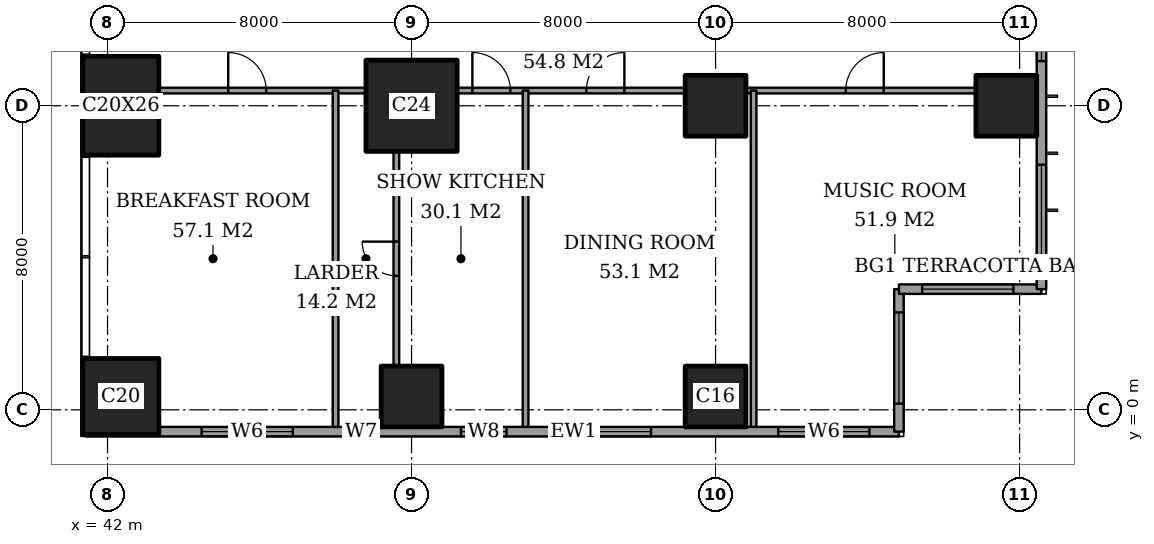
"""IFC4 building model, lengths in metres.
Left out: names, types, materials, properties, quantities, classifications, styles, units other than length and angle.
Written with IfcOpenShell. Run it as: python <this file> out.ifc"""

import sys

from ifc_helpers import new_model, si_unit, direction, frame, frame_2d, origin, origin_2d, place, context, subcontext, project, spatial, rectangle, extrude, element, fill, save


model = new_model("IFC4")
c1 = context("Model", 3, precision=1e-05, world=origin(), true_north=direction((0.0, 1.0)))
c2 = subcontext(c1, "Body", "Model", "MODEL_VIEW")
j1 = project(units=[si_unit("LENGTHUNIT", "METRE"), si_unit("PLANEANGLEUNIT", "RADIAN")], contexts=[c1])
p1 = place(None, origin())
s1 = spatial("IfcSite", under=j1, at=p1, CompositionType="ELEMENT")
p2 = place(p1, origin())
s2 = spatial("IfcBuilding", under=s1, at=p2, CompositionType="ELEMENT")
p3 = place(p2, frame((0.0, 0.0, 241.2)))
s3 = spatial("IfcBuildingStorey", under=s2, at=p3, CompositionType="ELEMENT", Elevation=241.2)
p4 = place(p3, frame((42.35, 0.35, 0.0), z_axis=(0.0, 0.0, 1.0), x_axis=(1.0, 0.0, 0.0)))
e1 = element("IfcColumn", 1, at=p4, inside=s3, PredefinedType="COLUMN", context=c2, shape_type="SweptSolid", body=[
    extrude(rectangle(XDim=2.0, YDim=2.0, at=origin_2d()), origin(), (0.0, 0.0, 1.0), 3.6),
])
p5 = place(p3, frame((42.35, 8.0, 0.0), z_axis=(0.0, 0.0, 1.0), x_axis=(1.0, 0.0, 0.0)))
e2 = element("IfcColumn", 2, at=p5, inside=s3, PredefinedType="COLUMN", context=c2, shape_type="SweptSolid", body=[
    extrude(rectangle(XDim=2.0, YDim=2.6, at=origin_2d()), origin(), (0.0, 0.0, 1.0), 3.6),
])
p6 = place(p3, frame((50.0, 0.35, 0.0), z_axis=(0.0, 0.0, 1.0), x_axis=(1.0, 0.0, 0.0)))
e3 = element("IfcColumn", 3, at=p6, inside=s3, PredefinedType="COLUMN", context=c2, shape_type="SweptSolid", body=[
    extrude(rectangle(XDim=1.6, YDim=1.6, at=origin_2d()), origin(), (0.0, 0.0, 1.0), 3.6),
])
p7 = place(p3, frame((50.0, 8.0, 0.0), z_axis=(0.0, 0.0, 1.0), x_axis=(1.0, 0.0, 0.0)))
e4 = element("IfcColumn", 4, at=p7, inside=s3, PredefinedType="COLUMN", context=c2, shape_type="SweptSolid", body=[
    extrude(rectangle(XDim=2.4, YDim=2.4, at=origin_2d()), origin(), (0.0, 0.0, 1.0), 3.6),
])
for number, where, z_axis, x_axis in (
    (5, (58.0, 0.35, 0.0), (0.0, 0.0, 1.0), (1.0, 0.0, 0.0)),
    (6, (58.0, 8.0, 0.0), (0.0, 0.0, 1.0), (1.0, 0.0, 0.0)),
    (7, (65.65, 8.0, 0.0), (0.0, 0.0, 1.0), (1.0, 0.0, 0.0)),
):
    element("IfcColumn", number, at=place(p3, frame(where, z_axis=z_axis, x_axis=x_axis)), inside=s3, PredefinedType="COLUMN", context=c2, shape_type="SweptSolid", body=[
        extrude(rectangle(XDim=1.6, YDim=1.6, at=origin_2d()), origin(), (0.0, 0.0, 1.0), 3.6),
    ])
p8 = place(p3, frame((41.425, -0.575, 0.0), z_axis=(0.0, 0.0, 1.0), x_axis=(1.0, 0.0, 0.0)))
e8 = element("IfcWall", 8, at=p8, inside=s3, PredefinedType="SOLIDWALL", context=c2, shape_type="SweptSolid", body=[
    extrude(rectangle(XDim=21.4, YDim=0.25, at=frame_2d((10.7, 0.0))), origin(), (0.0, 0.0, 1.0), 3.6),
])
p9 = place(p8, frame((3.05, 0.0, 0.6)))
e9 = element("IfcOpeningElement", 9, at=p9, cuts=e8, PredefinedType="OPENING", context=c2, shape_type="SweptSolid", body=[
    extrude(rectangle(XDim=2.4, YDim=2.0, at=frame_2d((1.2, 1.0))), frame((0.0, 0.135, 0.0), z_axis=(0.0, -1.0, 0.0), x_axis=(1.0, 0.0, 0.0)), (0.0, 0.0, 1.0), 0.27),
])
p10 = place(p8, frame((6.95, 0.0, 0.6)))
e10 = element("IfcOpeningElement", 10, at=p10, cuts=e8, PredefinedType="OPENING", context=c2, shape_type="SweptSolid", body=[
    extrude(rectangle(XDim=0.6, YDim=2.0, at=frame_2d((0.3, 1.0))), frame((0.0, 0.135, 0.0), z_axis=(0.0, -1.0, 0.0), x_axis=(1.0, 0.0, 0.0)), (0.0, 0.0, 1.0), 0.27),
])
p11 = place(p8, frame((9.875, 0.0, 0.6)))
e11 = element("IfcOpeningElement", 11, at=p11, cuts=e8, PredefinedType="OPENING", context=c2, shape_type="SweptSolid", body=[
    extrude(rectangle(XDim=1.2, YDim=2.0, at=frame_2d((0.6, 1.0))), frame((0.0, 0.135, 0.0), z_axis=(0.0, -1.0, 0.0), x_axis=(1.0, 0.0, 0.0)), (0.0, 0.0, 1.0), 0.27),
])
p12 = place(p8, frame((12.475, 0.0, 0.6)))
e12 = element("IfcOpeningElement", 12, at=p12, cuts=e8, PredefinedType="OPENING", context=c2, shape_type="SweptSolid", body=[
    extrude(rectangle(XDim=2.4, YDim=2.0, at=frame_2d((1.2, 1.0))), frame((0.0, 0.135, 0.0), z_axis=(0.0, -1.0, 0.0), x_axis=(1.0, 0.0, 0.0)), (0.0, 0.0, 1.0), 0.27),
])
p13 = place(p8, frame((18.225, 0.0, 0.6)))
e13 = element("IfcOpeningElement", 13, at=p13, cuts=e8, PredefinedType="OPENING", context=c2, shape_type="SweptSolid", body=[
    extrude(rectangle(XDim=2.4, YDim=2.0, at=frame_2d((1.2, 1.0))), frame((0.0, 0.135, 0.0), z_axis=(0.0, -1.0, 0.0), x_axis=(1.0, 0.0, 0.0)), (0.0, 0.0, 1.0), 0.27),
])
p14 = place(p3, frame((62.825, -0.575, 0.0), z_axis=(0.0, 0.0, 1.0), x_axis=(0.0, 1.0, 0.0)))
e14 = element("IfcWall", 14, at=p14, inside=s3, PredefinedType="SOLIDWALL", context=c2, shape_type="SweptSolid", body=[
    extrude(rectangle(XDim=3.75, YDim=0.25, at=frame_2d((1.875, 0.0))), origin(), (0.0, 0.0, 1.0), 3.6),
])
p15 = place(p14, frame((0.738, 0.0, 0.6)))
e15 = element("IfcOpeningElement", 15, at=p15, cuts=e14, PredefinedType="OPENING", context=c2, shape_type="SweptSolid", body=[
    extrude(rectangle(XDim=2.4, YDim=2.0, at=frame_2d((1.2, 1.0))), frame((0.0, 0.135, 0.0), z_axis=(0.0, -1.0, 0.0), x_axis=(1.0, 0.0, 0.0)), (0.0, 0.0, 1.0), 0.27),
])
p16 = place(p3, frame((62.825, 3.175, 0.0), z_axis=(0.0, 0.0, 1.0), x_axis=(1.0, 0.0, 0.0)))
e16 = element("IfcWall", 16, at=p16, inside=s3, PredefinedType="SOLIDWALL", context=c2, shape_type="SweptSolid", body=[
    extrude(rectangle(XDim=3.75, YDim=0.25, at=frame_2d((1.875, 0.0))), origin(), (0.0, 0.0, 1.0), 3.6),
])
p17 = place(p16, frame((0.613, 0.0, 0.6)))
e17 = element("IfcOpeningElement", 17, at=p17, cuts=e16, PredefinedType="OPENING", context=c2, shape_type="SweptSolid", body=[
    extrude(rectangle(XDim=2.4, YDim=2.0, at=frame_2d((1.2, 1.0))), frame((0.0, 0.135, 0.0), z_axis=(0.0, -1.0, 0.0), x_axis=(1.0, 0.0, 0.0)), (0.0, 0.0, 1.0), 0.27),
])
p18 = place(p3, frame((66.575, 3.175, 0.0), z_axis=(0.0, 0.0, 1.0), x_axis=(0.0, 1.0, 0.0)))
e18 = element("IfcWall", 18, at=p18, inside=s3, PredefinedType="SOLIDWALL", context=c2, shape_type="SweptSolid", body=[
    extrude(rectangle(XDim=41.65, YDim=0.25, at=frame_2d((20.825, 0.0))), origin(), (0.0, 0.0, 1.0), 3.6),
])
p19 = place(p18, frame((0.875, 0.0, 0.6)))
e19 = element("IfcOpeningElement", 19, at=p19, cuts=e18, PredefinedType="OPENING", context=c2, shape_type="SweptSolid", body=[
    extrude(rectangle(XDim=2.4, YDim=2.0, at=frame_2d((1.2, 1.0))), frame((0.0, 0.135, 0.0), z_axis=(0.0, -1.0, 0.0), x_axis=(1.0, 0.0, 0.0)), (0.0, 0.0, 1.0), 0.27),
])
p20 = place(p18, frame((6.0, 0.0, 0.6)))
e20 = element("IfcOpeningElement", 20, at=p20, cuts=e18, PredefinedType="OPENING", context=c2, shape_type="SweptSolid", body=[
    extrude(rectangle(XDim=1.2, YDim=2.0, at=frame_2d((0.6, 1.0))), frame((0.0, 0.135, 0.0), z_axis=(0.0, -1.0, 0.0), x_axis=(1.0, 0.0, 0.0)), (0.0, 0.0, 1.0), 0.27),
])
p21 = place(p18, frame((8.525, 0.0, 0.6)))
e21 = element("IfcOpeningElement", 21, at=p21, cuts=e18, PredefinedType="OPENING", context=c2, shape_type="SweptSolid", body=[
    extrude(rectangle(XDim=2.4, YDim=2.0, at=frame_2d((1.2, 1.0))), frame((0.0, 0.135, 0.0), z_axis=(0.0, -1.0, 0.0), x_axis=(1.0, 0.0, 0.0)), (0.0, 0.0, 1.0), 0.27),
])
p22 = place(p18, frame((15.725, 0.0, 0.6)))
e22 = element("IfcOpeningElement", 22, at=p22, cuts=e18, PredefinedType="OPENING", context=c2, shape_type="SweptSolid", body=[
    extrude(rectangle(XDim=2.4, YDim=2.0, at=frame_2d((1.2, 1.0))), frame((0.0, 0.135, 0.0), z_axis=(0.0, -1.0, 0.0), x_axis=(1.0, 0.0, 0.0)), (0.0, 0.0, 1.0), 0.27),
])
p23 = place(p18, frame((23.525, 0.0, 0.6)))
e23 = element("IfcOpeningElement", 23, at=p23, cuts=e18, PredefinedType="OPENING", context=c2, shape_type="SweptSolid", body=[
    extrude(rectangle(XDim=2.4, YDim=2.0, at=frame_2d((1.2, 1.0))), frame((0.0, 0.135, 0.0), z_axis=(0.0, -1.0, 0.0), x_axis=(1.0, 0.0, 0.0)), (0.0, 0.0, 1.0), 0.27),
])
p24 = place(p18, frame((30.625, 0.0, 0.6)))
e24 = element("IfcOpeningElement", 24, at=p24, cuts=e18, PredefinedType="OPENING", context=c2, shape_type="SweptSolid", body=[
    extrude(rectangle(XDim=2.4, YDim=2.0, at=frame_2d((1.2, 1.0))), frame((0.0, 0.135, 0.0), z_axis=(0.0, -1.0, 0.0), x_axis=(1.0, 0.0, 0.0)), (0.0, 0.0, 1.0), 0.27),
])
p25 = place(p18, frame((34.325, 0.0, 0.6)))
e25 = element("IfcOpeningElement", 25, at=p25, cuts=e18, PredefinedType="OPENING", context=c2, shape_type="SweptSolid", body=[
    extrude(rectangle(XDim=1.2, YDim=2.0, at=frame_2d((0.6, 1.0))), frame((0.0, 0.135, 0.0), z_axis=(0.0, -1.0, 0.0), x_axis=(1.0, 0.0, 0.0)), (0.0, 0.0, 1.0), 0.27),
])
p26 = place(p18, frame((38.375, 0.0, 0.6)))
e26 = element("IfcOpeningElement", 26, at=p26, cuts=e18, PredefinedType="OPENING", context=c2, shape_type="SweptSolid", body=[
    extrude(rectangle(XDim=2.4, YDim=2.0, at=frame_2d((1.2, 1.0))), frame((0.0, 0.135, 0.0), z_axis=(0.0, -1.0, 0.0), x_axis=(1.0, 0.0, 0.0)), (0.0, 0.0, 1.0), 0.27),
])
p27 = place(p3, frame((43.35, 8.4, 0.0), z_axis=(0.0, 0.0, 1.0), x_axis=(1.0, 0.0, 0.0)))
e27 = element("IfcWall", 27, at=p27, inside=s3, PredefinedType="PARTITIONING", context=c2, shape_type="SweptSolid", body=[
    extrude(rectangle(XDim=5.45, YDim=0.15, at=frame_2d((2.725, 0.0))), origin(), (0.0, 0.0, 1.0), 3.35),
])
p28 = place(p27, frame((1.825, 0.0, 0.0)))
e28 = element("IfcOpeningElement", 28, at=p28, cuts=e27, PredefinedType="OPENING", context=c2, shape_type="SweptSolid", body=[
    extrude(rectangle(XDim=1.0, YDim=2.1, at=frame_2d((0.5, 1.05))), frame((0.0, 0.085, 0.0), z_axis=(0.0, -1.0, 0.0), x_axis=(1.0, 0.0, 0.0)), (0.0, 0.0, 1.0), 0.17),
])
p29 = place(p3, frame((51.2, 8.4, 0.0), z_axis=(0.0, 0.0, 1.0), x_axis=(1.0, 0.0, 0.0)))
e29 = element("IfcWall", 29, at=p29, inside=s3, PredefinedType="PARTITIONING", context=c2, shape_type="SweptSolid", body=[
    extrude(rectangle(XDim=6.0, YDim=0.15, at=frame_2d((3.0, 0.0))), origin(), (0.0, 0.0, 1.0), 3.35),
])
p30 = place(p29, frame((3.4, 0.0, 0.0)))
e30 = element("IfcOpeningElement", 30, at=p30, cuts=e29, PredefinedType="OPENING", context=c2, shape_type="SweptSolid", body=[
    extrude(rectangle(XDim=1.0, YDim=2.1, at=frame_2d((0.5, 1.05))), frame((0.0, 0.085, 0.0), z_axis=(0.0, -1.0, 0.0), x_axis=(1.0, 0.0, 0.0)), (0.0, 0.0, 1.0), 0.17),
])
p31 = place(p29, frame((0.4, 0.0, 0.0)))
e31 = element("IfcOpeningElement", 31, at=p31, cuts=e29, PredefinedType="OPENING", context=c2, shape_type="SweptSolid", body=[
    extrude(rectangle(XDim=1.0, YDim=2.1, at=frame_2d((0.5, 1.05))), frame((0.0, 0.085, 0.0), z_axis=(0.0, -1.0, 0.0), x_axis=(1.0, 0.0, 0.0)), (0.0, 0.0, 1.0), 0.17),
])
p32 = place(p3, frame((58.8, 8.4, 0.0), z_axis=(0.0, 0.0, 1.0), x_axis=(1.0, 0.0, 0.0)))
e32 = element("IfcWall", 32, at=p32, inside=s3, PredefinedType="PARTITIONING", context=c2, shape_type="SweptSolid", body=[
    extrude(rectangle(XDim=6.05, YDim=0.15, at=frame_2d((3.025, 0.0))), origin(), (0.0, 0.0, 1.0), 3.35),
])
p33 = place(p32, frame((2.625, 0.0, 0.0)))
e33 = element("IfcOpeningElement", 33, at=p33, cuts=e32, PredefinedType="OPENING", context=c2, shape_type="SweptSolid", body=[
    extrude(rectangle(XDim=1.0, YDim=2.1, at=frame_2d((0.5, 1.05))), frame((0.0, 0.085, 0.0), z_axis=(0.0, -1.0, 0.0), x_axis=(1.0, 0.0, 0.0)), (0.0, 0.0, 1.0), 0.17),
])
p34 = place(p3, frame((48.0, -0.45, 0.0), z_axis=(0.0, 0.0, 1.0), x_axis=(0.0, 1.0, 0.0)))
e34 = element("IfcWall", 34, at=p34, inside=s3, PredefinedType="PARTITIONING", context=c2, shape_type="SweptSolid", body=[
    extrude(rectangle(XDim=8.85, YDim=0.15, at=frame_2d((4.425, 0.0))), origin(), (0.0, 0.0, 1.0), 3.35),
])
p35 = place(p3, frame((49.6, 1.15, 0.0), z_axis=(0.0, 0.0, 1.0), x_axis=(0.0, 1.0, 0.0)))
e35 = element("IfcWall", 35, at=p35, inside=s3, PredefinedType="PARTITIONING", context=c2, shape_type="SweptSolid", body=[
    extrude(rectangle(XDim=5.65, YDim=0.15, at=frame_2d((2.825, 0.0))), origin(), (0.0, 0.0, 1.0), 3.35),
])
p36 = place(p35, frame((2.375, 0.0, 0.0)))
e36 = element("IfcOpeningElement", 36, at=p36, cuts=e35, PredefinedType="OPENING", context=c2, shape_type="SweptSolid", body=[
    extrude(rectangle(XDim=0.9, YDim=2.1, at=frame_2d((0.45, 1.05))), frame((0.0, 0.085, 0.0), z_axis=(0.0, -1.0, 0.0), x_axis=(1.0, 0.0, 0.0)), (0.0, 0.0, 1.0), 0.17),
])
for number, where, z_axis, x_axis in (
    (37, (53.0, -0.45, 0.0), (0.0, 0.0, 1.0), (0.0, 1.0, 0.0)),
    (38, (59.0, -0.45, 0.0), (0.0, 0.0, 1.0), (0.0, 1.0, 0.0)),
):
    element("IfcWall", number, at=place(p3, frame(where, z_axis=z_axis, x_axis=x_axis)), inside=s3, PredefinedType="PARTITIONING", context=c2, shape_type="SweptSolid", body=[
        extrude(rectangle(XDim=8.85, YDim=0.15, at=frame_2d((4.425, 0.0))), origin(), (0.0, 0.0, 1.0), 3.35),
    ])
p37 = place(p9, origin())
e39 = element("IfcWindow", 39, at=p37, inside=s3, PartitioningType="SINGLE_PANEL", PredefinedType="WINDOW", context=c2, shape_type="SweptSolid", body=[
    extrude(rectangle(XDim=2.4, YDim=2.0, at=frame_2d((1.2, 1.0))), frame((0.0, 0.03, 0.0), z_axis=(0.0, -1.0, 0.0), x_axis=(1.0, 0.0, 0.0)), (0.0, 0.0, 1.0), 0.06),
])
fill(e9, e39)
p38 = place(p10, origin())
e40 = element("IfcWindow", 40, at=p38, inside=s3, PartitioningType="SINGLE_PANEL", PredefinedType="WINDOW", context=c2, shape_type="SweptSolid", body=[
    extrude(rectangle(XDim=0.6, YDim=2.0, at=frame_2d((0.3, 1.0))), frame((0.0, 0.03, 0.0), z_axis=(0.0, -1.0, 0.0), x_axis=(1.0, 0.0, 0.0)), (0.0, 0.0, 1.0), 0.06),
])
fill(e10, e40)
p39 = place(p11, origin())
e41 = element("IfcWindow", 41, at=p39, inside=s3, PartitioningType="SINGLE_PANEL", PredefinedType="WINDOW", context=c2, shape_type="SweptSolid", body=[
    extrude(rectangle(XDim=1.2, YDim=2.0, at=frame_2d((0.6, 1.0))), frame((0.0, 0.03, 0.0), z_axis=(0.0, -1.0, 0.0), x_axis=(1.0, 0.0, 0.0)), (0.0, 0.0, 1.0), 0.06),
])
fill(e11, e41)
p40 = place(p12, origin())
e42 = element("IfcWindow", 42, at=p40, inside=s3, PartitioningType="SINGLE_PANEL", PredefinedType="WINDOW", context=c2, shape_type="SweptSolid", body=[
    extrude(rectangle(XDim=2.4, YDim=2.0, at=frame_2d((1.2, 1.0))), frame((0.0, 0.03, 0.0), z_axis=(0.0, -1.0, 0.0), x_axis=(1.0, 0.0, 0.0)), (0.0, 0.0, 1.0), 0.06),
])
fill(e12, e42)
p41 = place(p13, origin())
e43 = element("IfcWindow", 43, at=p41, inside=s3, PartitioningType="SINGLE_PANEL", PredefinedType="WINDOW", context=c2, shape_type="SweptSolid", body=[
    extrude(rectangle(XDim=2.4, YDim=2.0, at=frame_2d((1.2, 1.0))), frame((0.0, 0.03, 0.0), z_axis=(0.0, -1.0, 0.0), x_axis=(1.0, 0.0, 0.0)), (0.0, 0.0, 1.0), 0.06),
])
fill(e13, e43)
p42 = place(p15, origin())
e44 = element("IfcWindow", 44, at=p42, inside=s3, PartitioningType="SINGLE_PANEL", PredefinedType="WINDOW", context=c2, shape_type="SweptSolid", body=[
    extrude(rectangle(XDim=2.4, YDim=2.0, at=frame_2d((1.2, 1.0))), frame((0.0, 0.03, 0.0), z_axis=(0.0, -1.0, 0.0), x_axis=(1.0, 0.0, 0.0)), (0.0, 0.0, 1.0), 0.06),
])
fill(e15, e44)
p43 = place(p17, origin())
e45 = element("IfcWindow", 45, at=p43, inside=s3, PartitioningType="SINGLE_PANEL", PredefinedType="WINDOW", context=c2, shape_type="SweptSolid", body=[
    extrude(rectangle(XDim=2.4, YDim=2.0, at=frame_2d((1.2, 1.0))), frame((0.0, 0.03, 0.0), z_axis=(0.0, -1.0, 0.0), x_axis=(1.0, 0.0, 0.0)), (0.0, 0.0, 1.0), 0.06),
])
fill(e17, e45)
p44 = place(p19, origin())
e46 = element("IfcWindow", 46, at=p44, inside=s3, PartitioningType="SINGLE_PANEL", PredefinedType="WINDOW", context=c2, shape_type="SweptSolid", body=[
    extrude(rectangle(XDim=2.4, YDim=2.0, at=frame_2d((1.2, 1.0))), frame((0.0, 0.03, 0.0), z_axis=(0.0, -1.0, 0.0), x_axis=(1.0, 0.0, 0.0)), (0.0, 0.0, 1.0), 0.06),
])
fill(e19, e46)
p45 = place(p20, origin())
e47 = element("IfcWindow", 47, at=p45, inside=s3, PartitioningType="SINGLE_PANEL", PredefinedType="WINDOW", context=c2, shape_type="SweptSolid", body=[
    extrude(rectangle(XDim=1.2, YDim=2.0, at=frame_2d((0.6, 1.0))), frame((0.0, 0.03, 0.0), z_axis=(0.0, -1.0, 0.0), x_axis=(1.0, 0.0, 0.0)), (0.0, 0.0, 1.0), 0.06),
])
fill(e20, e47)
p46 = place(p33, origin())
e48 = element("IfcDoor", 48, at=p46, inside=s3, OperationType="SINGLE_SWING_LEFT", PredefinedType="DOOR", context=c2, shape_type="SweptSolid", body=[
    extrude(rectangle(XDim=1.0, YDim=2.1, at=frame_2d((0.5, 1.05))), frame((0.0, 0.025, 0.0), z_axis=(0.0, -1.0, 0.0), x_axis=(1.0, 0.0, 0.0)), (0.0, 0.0, 1.0), 0.05),
])
fill(e33, e48)
p47 = place(p30, origin())
e49 = element("IfcDoor", 49, at=p47, inside=s3, OperationType="SINGLE_SWING_LEFT", PredefinedType="DOOR", context=c2, shape_type="SweptSolid", body=[
    extrude(rectangle(XDim=1.0, YDim=2.1, at=frame_2d((0.5, 1.05))), frame((0.0, 0.025, 0.0), z_axis=(0.0, -1.0, 0.0), x_axis=(1.0, 0.0, 0.0)), (0.0, 0.0, 1.0), 0.05),
])
fill(e30, e49)
p48 = place(p31, origin())
e50 = element("IfcDoor", 50, at=p48, inside=s3, OperationType="SINGLE_SWING_RIGHT", PredefinedType="DOOR", context=c2, shape_type="SweptSolid", body=[
    extrude(rectangle(XDim=1.0, YDim=2.1, at=frame_2d((0.5, 1.05))), frame((0.0, 0.025, 0.0), z_axis=(0.0, -1.0, 0.0), x_axis=(1.0, 0.0, 0.0)), (0.0, 0.0, 1.0), 0.05),
])
fill(e31, e50)
p49 = place(p36, origin())
e51 = element("IfcDoor", 51, at=p49, inside=s3, OperationType="SINGLE_SWING_LEFT", PredefinedType="DOOR", context=c2, shape_type="SweptSolid", body=[
    extrude(rectangle(XDim=0.9, YDim=2.1, at=frame_2d((0.45, 1.05))), frame((0.0, 0.025, 0.0), z_axis=(0.0, -1.0, 0.0), x_axis=(1.0, 0.0, 0.0)), (0.0, 0.0, 1.0), 0.05),
])
fill(e36, e51)
p50 = place(p28, origin())
e52 = element("IfcDoor", 52, at=p50, inside=s3, OperationType="SINGLE_SWING_RIGHT", PredefinedType="DOOR", context=c2, shape_type="SweptSolid", body=[
    extrude(rectangle(XDim=1.0, YDim=2.1, at=frame_2d((0.5, 1.05))), frame((0.0, 0.025, 0.0), z_axis=(0.0, -1.0, 0.0), x_axis=(1.0, 0.0, 0.0)), (0.0, 0.0, 1.0), 0.05),
])
fill(e28, e52)
save(model, sys.argv[1])
